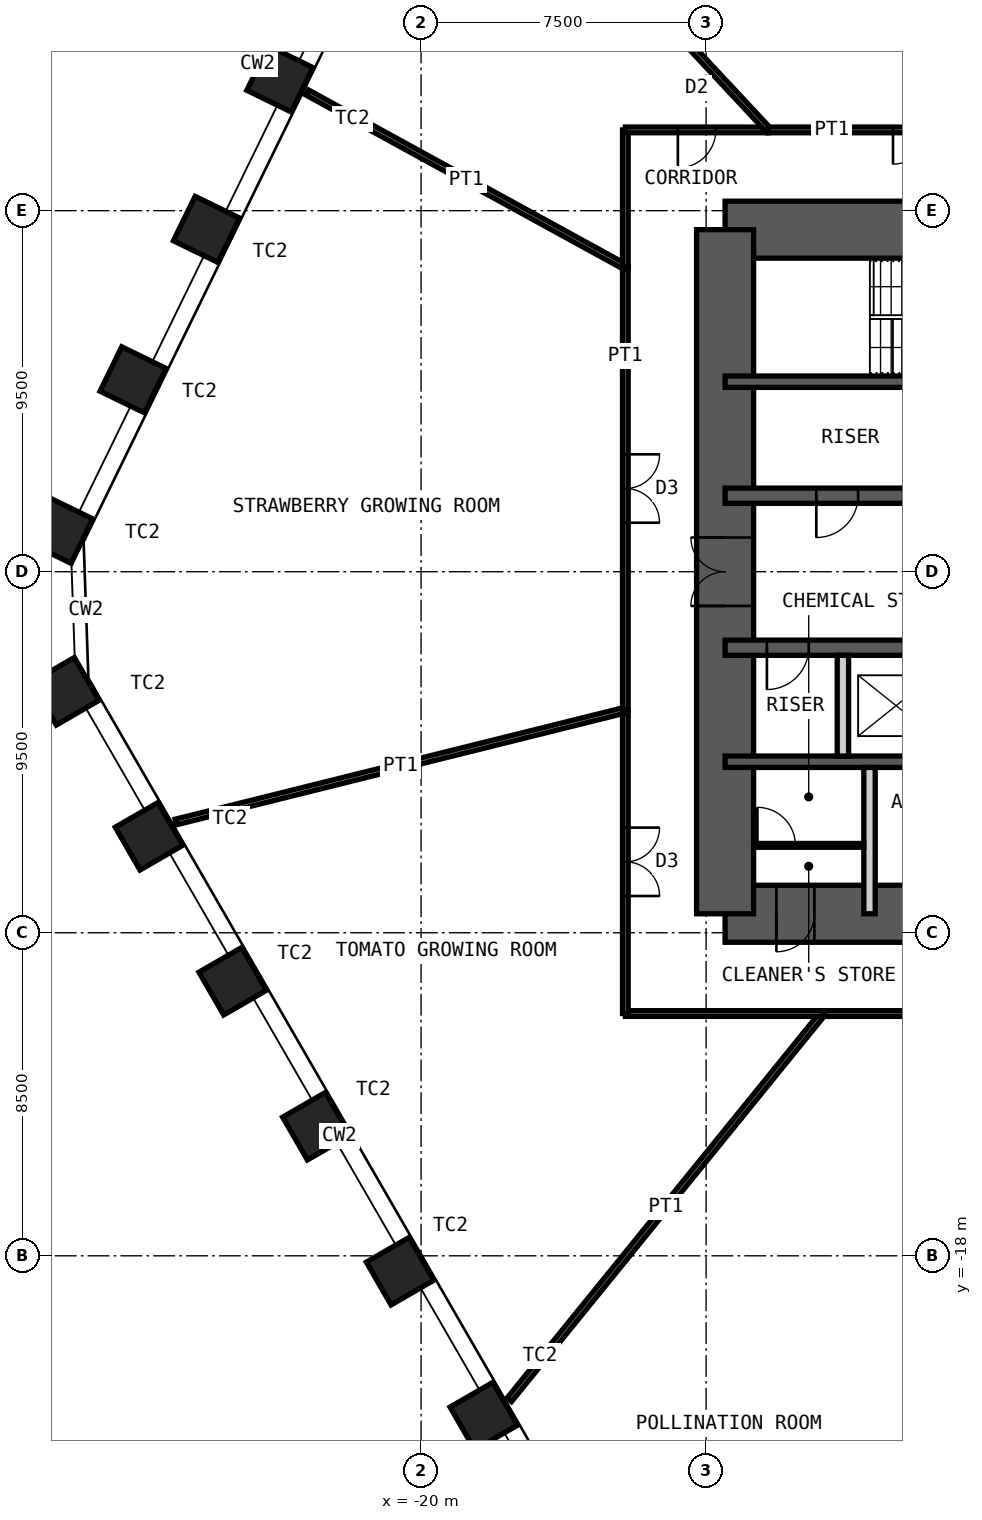
"""IFC4 building model, lengths in metres.
Left out: names, types, materials, properties, quantities, classifications, styles, units other than length and angle.
Written with IfcOpenShell. Run it as: python <this file> out.ifc"""

import sys

from ifc_helpers import new_model, si_unit, direction, frame, frame_2d, origin, origin_2d, place, context, subcontext, project, spatial, rectangle, hollow_rectangle, extrude, element, fill, save


model = new_model("IFC4")
c1 = context("Model", 3, precision=1e-05, world=origin(), true_north=direction((0.0, 1.0)))
c2 = subcontext(c1, "Body", "Model", "MODEL_VIEW")
j1 = project(units=[si_unit("LENGTHUNIT", "METRE"), si_unit("PLANEANGLEUNIT", "RADIAN")], contexts=[c1])
p1 = place(None, origin())
s1 = spatial("IfcSite", under=j1, at=p1, CompositionType="ELEMENT")
p2 = place(p1, origin())
s2 = spatial("IfcBuilding", under=s1, at=p2, CompositionType="ELEMENT")
p3 = place(p2, frame((0.0, 0.0, 77.0)))
s3 = spatial("IfcBuildingStorey", under=s2, at=p3, CompositionType="ELEMENT", Elevation=77.0)
for number, where, z_axis, x_axis in (
    (1, (-18.349, -22.218, 0.0), (0.0, 0.0, 1.0), (0.5, -0.866, 0.0)),
    (2, (-20.552, -18.404, 0.0), (0.0, 0.0, 1.0), (0.5, -0.866, 0.0)),
    (3, (-22.754, -14.589, 0.0), (0.0, 0.0, 1.0), (0.5, -0.866, 0.0)),
    (4, (-24.956, -10.775, 0.0), (0.0, 0.0, 1.0), (0.5, -0.866, 0.0)),
    (5, (-27.158, -6.96, 0.0), (0.0, 0.0, 1.0), (0.5, -0.866, 0.0)),
    (6, (-29.361, -3.146, 0.0), (0.0, 0.0, 1.0), (0.5, -0.866, 0.0)),
    (7, (-29.509, 1.09, 0.0), (0.0, 0.0, 1.0), (-0.438, -0.899, 0.0)),
    (8, (-27.578, 5.049, 0.0), (0.0, 0.0, 1.0), (-0.438, -0.899, 0.0)),
    (9, (-25.647, 9.008, 0.0), (0.0, 0.0, 1.0), (-0.438, -0.899, 0.0)),
    (10, (-23.716, 12.966, 0.0), (0.0, 0.0, 1.0), (-0.438, -0.899, 0.0)),
):
    element("IfcColumn", number, at=place(p3, frame(where, z_axis=z_axis, x_axis=x_axis)), inside=s3, PredefinedType="COLUMN", context=c2, shape_type="SweptSolid", body=[
        extrude(hollow_rectangle(XDim=1.3, YDim=1.3, WallThickness=0.1, at=origin_2d()), origin(), (0.0, 0.0, 1.0), 5.0),
    ])
p4 = place(p3, frame((-12.0, 9.0, 0.0), z_axis=(0.0, 0.0, 1.0), x_axis=(1.0, 0.0, 0.0)))
e11 = element("IfcWall", 11, at=p4, inside=s3, PredefinedType="SHEAR", context=c2, shape_type="SweptSolid", body=[
    extrude(rectangle(XDim=24.0, YDim=1.5, at=frame_2d((12.0, 0.0))), origin(), (0.0, 0.0, 1.0), 5.0),
])
p5 = place(p4, frame((10.4, 0.0, 0.0)))
e12 = element("IfcOpeningElement", 12, at=p5, cuts=e11, PredefinedType="OPENING", context=c2, shape_type="SweptSolid", body=[
    extrude(rectangle(XDim=1.0, YDim=2.1, at=frame_2d((0.5, 1.05))), frame((0.0, 0.76, 0.0), z_axis=(0.0, -1.0, 0.0), x_axis=(1.0, 0.0, 0.0)), (0.0, 0.0, 1.0), 1.52),
])
p6 = place(p4, frame((17.6, 0.0, 0.0)))
e13 = element("IfcOpeningElement", 13, at=p6, cuts=e11, PredefinedType="OPENING", context=c2, shape_type="SweptSolid", body=[
    extrude(rectangle(XDim=0.9, YDim=2.1, at=frame_2d((0.45, 1.05))), frame((0.0, 0.76, 0.0), z_axis=(0.0, -1.0, 0.0), x_axis=(1.0, 0.0, 0.0)), (0.0, 0.0, 1.0), 1.52),
])
p7 = place(p4, frame((21.9, 0.0, 0.0)))
e14 = element("IfcOpeningElement", 14, at=p7, cuts=e11, PredefinedType="OPENING", context=c2, shape_type="SweptSolid", body=[
    extrude(rectangle(XDim=0.9, YDim=2.1, at=frame_2d((0.45, 1.05))), frame((0.0, 0.76, 0.0), z_axis=(0.0, -1.0, 0.0), x_axis=(1.0, 0.0, 0.0)), (0.0, 0.0, 1.0), 1.52),
])
p8 = place(p3, frame((-12.0, -9.0, 0.0), z_axis=(0.0, 0.0, 1.0), x_axis=(1.0, 0.0, 0.0)))
e15 = element("IfcWall", 15, at=p8, inside=s3, PredefinedType="SHEAR", context=c2, shape_type="SweptSolid", body=[
    extrude(rectangle(XDim=24.0, YDim=1.5, at=frame_2d((12.0, 0.0))), origin(), (0.0, 0.0, 1.0), 5.0),
])
p9 = place(p8, frame((1.35, 0.0, 0.0)))
e16 = element("IfcOpeningElement", 16, at=p9, cuts=e15, PredefinedType="OPENING", context=c2, shape_type="SweptSolid", body=[
    extrude(rectangle(XDim=1.0, YDim=2.1, at=frame_2d((0.5, 1.05))), frame((0.0, 0.76, 0.0), z_axis=(0.0, -1.0, 0.0), x_axis=(1.0, 0.0, 0.0)), (0.0, 0.0, 1.0), 1.52),
])
p10 = place(p8, frame((5.325, 0.0, 0.0)))
e17 = element("IfcOpeningElement", 17, at=p10, cuts=e15, PredefinedType="OPENING", context=c2, shape_type="SweptSolid", body=[
    extrude(rectangle(XDim=1.15, YDim=2.1, at=frame_2d((0.575, 1.05))), frame((0.0, 0.76, 0.0), z_axis=(0.0, -1.0, 0.0), x_axis=(1.0, 0.0, 0.0)), (0.0, 0.0, 1.0), 1.52),
])
p11 = place(p8, frame((12.6, 0.0, 0.0)))
e18 = element("IfcOpeningElement", 18, at=p11, cuts=e15, PredefinedType="OPENING", context=c2, shape_type="SweptSolid", body=[
    extrude(rectangle(XDim=1.0, YDim=2.1, at=frame_2d((0.5, 1.05))), frame((0.0, 0.76, 0.0), z_axis=(0.0, -1.0, 0.0), x_axis=(1.0, 0.0, 0.0)), (0.0, 0.0, 1.0), 1.52),
])
p12 = place(p3, frame((-12.0, -9.0, 0.0), z_axis=(0.0, 0.0, 1.0), x_axis=(0.0, 1.0, 0.0)))
e19 = element("IfcWall", 19, at=p12, inside=s3, PredefinedType="SHEAR", context=c2, shape_type="SweptSolid", body=[
    extrude(rectangle(XDim=18.0, YDim=1.5, at=frame_2d((9.0, 0.0))), origin(), (0.0, 0.0, 1.0), 5.0),
])
p13 = place(p12, frame((8.1, 0.0, 0.0)))
e20 = element("IfcOpeningElement", 20, at=p13, cuts=e19, PredefinedType="OPENING", context=c2, shape_type="SweptSolid", body=[
    extrude(rectangle(XDim=1.8, YDim=2.1, at=frame_2d((0.9, 1.05))), frame((0.0, 0.76, 0.0), z_axis=(0.0, -1.0, 0.0), x_axis=(1.0, 0.0, 0.0)), (0.0, 0.0, 1.0), 1.52),
])
p14 = place(p3, frame((-12.0, 5.0, 0.0), z_axis=(0.0, 0.0, 1.0), x_axis=(1.0, 0.0, 0.0)))
e21 = element("IfcWall", 21, at=p14, inside=s3, PredefinedType="SHEAR", context=c2, shape_type="SweptSolid", body=[
    extrude(rectangle(XDim=24.0, YDim=0.3, at=frame_2d((12.0, 0.0))), origin(), (0.0, 0.0, 1.0), 5.0),
])
p15 = place(p3, frame((-12.0, 2.0, 0.0), z_axis=(0.0, 0.0, 1.0), x_axis=(1.0, 0.0, 0.0)))
e22 = element("IfcWall", 22, at=p15, inside=s3, PredefinedType="SHEAR", context=c2, shape_type="SweptSolid", body=[
    extrude(rectangle(XDim=24.0, YDim=0.4, at=frame_2d((12.0, 0.0))), origin(), (0.0, 0.0, 1.0), 5.0),
])
p16 = place(p15, frame((2.4, 0.0, 0.0)))
e23 = element("IfcOpeningElement", 23, at=p16, cuts=e22, PredefinedType="OPENING", context=c2, shape_type="SweptSolid", body=[
    extrude(rectangle(XDim=1.1, YDim=2.1, at=frame_2d((0.55, 1.05))), frame((0.0, 0.21, 0.0), z_axis=(0.0, -1.0, 0.0), x_axis=(1.0, 0.0, 0.0)), (0.0, 0.0, 1.0), 0.42),
])
p17 = place(p15, frame((22.0, 0.0, 0.0)))
e24 = element("IfcOpeningElement", 24, at=p17, cuts=e22, PredefinedType="OPENING", context=c2, shape_type="SweptSolid", body=[
    extrude(rectangle(XDim=1.1, YDim=2.1, at=frame_2d((0.55, 1.05))), frame((0.0, 0.21, 0.0), z_axis=(0.0, -1.0, 0.0), x_axis=(1.0, 0.0, 0.0)), (0.0, 0.0, 1.0), 0.42),
])
p18 = place(p15, frame((10.15, 0.0, 0.0)))
e25 = element("IfcOpeningElement", 25, at=p18, cuts=e22, PredefinedType="OPENING", context=c2, shape_type="SweptSolid", body=[
    extrude(rectangle(XDim=1.0, YDim=2.1, at=frame_2d((0.5, 1.05))), frame((0.0, 0.21, 0.0), z_axis=(0.0, -1.0, 0.0), x_axis=(1.0, 0.0, 0.0)), (0.0, 0.0, 1.0), 0.42),
])
p19 = place(p15, frame((6.7, 0.0, 0.0)))
e26 = element("IfcOpeningElement", 26, at=p19, cuts=e22, PredefinedType="OPENING", context=c2, shape_type="SweptSolid", body=[
    extrude(rectangle(XDim=1.4, YDim=2.4, at=frame_2d((0.7, 1.2))), frame((0.0, 0.21, 0.0), z_axis=(0.0, -1.0, 0.0), x_axis=(1.0, 0.0, 0.0)), (0.0, 0.0, 1.0), 0.42),
])
p20 = place(p15, frame((13.35, 0.0, 0.0)))
e27 = element("IfcOpeningElement", 27, at=p20, cuts=e22, PredefinedType="OPENING", context=c2, shape_type="SweptSolid", body=[
    extrude(rectangle(XDim=1.1, YDim=2.4, at=frame_2d((0.55, 1.2))), frame((0.0, 0.21, 0.0), z_axis=(0.0, -1.0, 0.0), x_axis=(1.0, 0.0, 0.0)), (0.0, 0.0, 1.0), 0.42),
])
p21 = place(p15, frame((16.15, 0.0, 0.0)))
e28 = element("IfcOpeningElement", 28, at=p21, cuts=e22, PredefinedType="OPENING", context=c2, shape_type="SweptSolid", body=[
    extrude(rectangle(XDim=1.1, YDim=2.4, at=frame_2d((0.55, 1.2))), frame((0.0, 0.21, 0.0), z_axis=(0.0, -1.0, 0.0), x_axis=(1.0, 0.0, 0.0)), (0.0, 0.0, 1.0), 0.42),
])
p22 = place(p15, frame((18.95, 0.0, 0.0)))
e29 = element("IfcOpeningElement", 29, at=p22, cuts=e22, PredefinedType="OPENING", context=c2, shape_type="SweptSolid", body=[
    extrude(rectangle(XDim=1.1, YDim=2.4, at=frame_2d((0.55, 1.2))), frame((0.0, 0.21, 0.0), z_axis=(0.0, -1.0, 0.0), x_axis=(1.0, 0.0, 0.0)), (0.0, 0.0, 1.0), 0.42),
])
p23 = place(p3, frame((-12.0, -2.0, 0.0), z_axis=(0.0, 0.0, 1.0), x_axis=(1.0, 0.0, 0.0)))
e30 = element("IfcWall", 30, at=p23, inside=s3, PredefinedType="SHEAR", context=c2, shape_type="SweptSolid", body=[
    extrude(rectangle(XDim=24.0, YDim=0.4, at=frame_2d((12.0, 0.0))), origin(), (0.0, 0.0, 1.0), 5.0),
])
p24 = place(p23, frame((1.1, 0.0, 0.0)))
e31 = element("IfcOpeningElement", 31, at=p24, cuts=e30, PredefinedType="OPENING", context=c2, shape_type="SweptSolid", body=[
    extrude(rectangle(XDim=1.1, YDim=2.1, at=frame_2d((0.55, 1.05))), frame((0.0, 0.21, 0.0), z_axis=(0.0, -1.0, 0.0), x_axis=(1.0, 0.0, 0.0)), (0.0, 0.0, 1.0), 0.42),
])
p25 = place(p23, frame((13.55, 0.0, 0.0)))
e32 = element("IfcOpeningElement", 32, at=p25, cuts=e30, PredefinedType="OPENING", context=c2, shape_type="SweptSolid", body=[
    extrude(rectangle(XDim=1.1, YDim=2.1, at=frame_2d((0.55, 1.05))), frame((0.0, 0.21, 0.0), z_axis=(0.0, -1.0, 0.0), x_axis=(1.0, 0.0, 0.0)), (0.0, 0.0, 1.0), 0.42),
])
p26 = place(p23, frame((20.7, 0.0, 0.0)))
e33 = element("IfcOpeningElement", 33, at=p26, cuts=e30, PredefinedType="OPENING", context=c2, shape_type="SweptSolid", body=[
    extrude(rectangle(XDim=1.1, YDim=2.1, at=frame_2d((0.55, 1.05))), frame((0.0, 0.21, 0.0), z_axis=(0.0, -1.0, 0.0), x_axis=(1.0, 0.0, 0.0)), (0.0, 0.0, 1.0), 0.42),
])
p27 = place(p3, frame((-12.0, -5.0, 0.0), z_axis=(0.0, 0.0, 1.0), x_axis=(1.0, 0.0, 0.0)))
e34 = element("IfcWall", 34, at=p27, inside=s3, PredefinedType="SHEAR", context=c2, shape_type="SweptSolid", body=[
    extrude(rectangle(XDim=24.0, YDim=0.3, at=frame_2d((12.0, 0.0))), origin(), (0.0, 0.0, 1.0), 5.0),
])
p28 = place(p3, frame((-8.9, -4.85, 0.0), z_axis=(0.0, 0.0, 1.0), x_axis=(0.0, 1.0, 0.0)))
e35 = element("IfcWall", 35, at=p28, inside=s3, PredefinedType="PARTITIONING", context=c2, shape_type="SweptSolid", body=[
    extrude(rectangle(XDim=2.65, YDim=0.3, at=frame_2d((1.325, 0.0))), origin(), (0.0, 0.0, 1.0), 4.78),
])
p29 = place(p3, frame((-8.2, -9.0, 0.0), z_axis=(0.0, 0.0, 1.0), x_axis=(0.0, 1.0, 0.0)))
e36 = element("IfcWall", 36, at=p29, inside=s3, PredefinedType="PARTITIONING", context=c2, shape_type="SweptSolid", body=[
    extrude(rectangle(XDim=3.85, YDim=0.3, at=frame_2d((1.925, 0.0))), origin(), (0.0, 0.0, 1.0), 4.78),
])
p30 = place(p3, frame((-11.25, -7.2, 0.0), z_axis=(0.0, 0.0, 1.0), x_axis=(1.0, 0.0, 0.0)))
e37 = element("IfcWall", 37, at=p30, inside=s3, PredefinedType="PARTITIONING", context=c2, shape_type="SweptSolid", body=[
    extrude(rectangle(XDim=2.9, YDim=0.1, at=frame_2d((1.45, 0.0))), origin(), (0.0, 0.0, 1.0), 4.78),
])
p31 = place(p30, frame((0.1, 0.0, 0.0)))
e38 = element("IfcOpeningElement", 38, at=p31, cuts=e37, PredefinedType="OPENING", context=c2, shape_type="SweptSolid", body=[
    extrude(rectangle(XDim=1.0, YDim=2.4, at=frame_2d((0.5, 1.2))), frame((0.0, 0.06, 0.0), z_axis=(0.0, -1.0, 0.0), x_axis=(1.0, 0.0, 0.0)), (0.0, 0.0, 1.0), 0.12),
])
p32 = place(p3, frame((-8.179, -26.843, 0.0), z_axis=(0.0, 0.0, 1.0), x_axis=(0.291466333136, 0.956581087336, 0.0)))
e39 = element("IfcWall", 39, at=p32, inside=s3, PredefinedType="PARTITIONING", context=c2, shape_type="SweptSolid", body=[
    extrude(rectangle(XDim=15.908, YDim=0.15, at=frame_2d((7.954, 0.0))), origin(), (0.0, 0.0, 1.0), 3.7),
])
p33 = place(p3, frame((-3.542, -11.625, 0.0), z_axis=(0.0, 0.0, 1.0), x_axis=(-1.0, 0.0, 0.0)))
e40 = element("IfcWall", 40, at=p33, inside=s3, PredefinedType="PARTITIONING", context=c2, shape_type="SweptSolid", body=[
    extrude(rectangle(XDim=5.89, YDim=0.15, at=frame_2d((2.945, 0.0))), origin(), (0.0, 0.0, 1.0), 4.8),
])
p34 = place(p33, frame((2.445, 0.0, 0.0)))
e41 = element("IfcOpeningElement", 41, at=p34, cuts=e40, PredefinedType="OPENING", context=c2, shape_type="SweptSolid", body=[
    extrude(rectangle(XDim=1.0, YDim=2.4, at=frame_2d((0.5, 1.2))), frame((0.0, 0.085, 0.0), z_axis=(0.0, -1.0, 0.0), x_axis=(1.0, 0.0, 0.0)), (0.0, 0.0, 1.0), 0.17),
])
p35 = place(p3, frame((-17.68, -21.791, 0.0), z_axis=(0.0, 0.0, 1.0), x_axis=(0.630054650118, 0.776550795418, 0.0)))
e42 = element("IfcWall", 42, at=p35, inside=s3, PredefinedType="PARTITIONING", context=c2, shape_type="SweptSolid", body=[
    extrude(rectangle(XDim=13.091, YDim=0.15, at=frame_2d((6.545, 0.0))), origin(), (0.0, 0.0, 1.0), 3.7),
])
p36 = place(p3, frame((-9.432, -11.625, 0.0), z_axis=(0.0, 0.0, 1.0), x_axis=(-1.0, 0.0, 0.0)))
e43 = element("IfcWall", 43, at=p36, inside=s3, PredefinedType="PARTITIONING", context=c2, shape_type="SweptSolid", body=[
    extrude(rectangle(XDim=5.193, YDim=0.15, at=frame_2d((2.596, 0.0))), origin(), (0.0, 0.0, 1.0), 4.8),
])
p37 = place(p3, frame((-14.625, -11.625, 0.0), z_axis=(0.0, 0.0, 1.0), x_axis=(0.0, 1.0, 0.0)))
e44 = element("IfcWall", 44, at=p37, inside=s3, PredefinedType="PARTITIONING", context=c2, shape_type="SweptSolid", body=[
    extrude(rectangle(XDim=7.984, YDim=0.15, at=frame_2d((3.992, 0.0))), origin(), (0.0, 0.0, 1.0), 4.8),
])
p38 = place(p37, frame((3.092, 0.0, 0.0)))
e45 = element("IfcOpeningElement", 45, at=p38, cuts=e44, PredefinedType="OPENING", context=c2, shape_type="SweptSolid", body=[
    extrude(rectangle(XDim=1.8, YDim=2.4, at=frame_2d((0.9, 1.2))), frame((0.0, 0.085, 0.0), z_axis=(0.0, -1.0, 0.0), x_axis=(1.0, 0.0, 0.0)), (0.0, 0.0, 1.0), 0.17),
])
p39 = place(p3, frame((-26.455, -6.586, 0.0), z_axis=(0.0, 0.0, 1.0), x_axis=(0.970383505188, 0.241569561118, 0.0)))
e46 = element("IfcWall", 46, at=p39, inside=s3, PredefinedType="PARTITIONING", context=c2, shape_type="SweptSolid", body=[
    extrude(rectangle(XDim=12.191, YDim=0.15, at=frame_2d((6.096, 0.0))), origin(), (0.0, 0.0, 1.0), 3.7),
])
p40 = place(p3, frame((-14.625, -3.641, 0.0), z_axis=(0.0, 0.0, 1.0), x_axis=(0.0, 1.0, 0.0)))
e47 = element("IfcWall", 47, at=p40, inside=s3, PredefinedType="PARTITIONING", context=c2, shape_type="SweptSolid", body=[
    extrude(rectangle(XDim=11.66, YDim=0.15, at=frame_2d((5.83, 0.0))), origin(), (0.0, 0.0, 1.0), 4.8),
])
p41 = place(p40, frame((4.93, 0.0, 0.0)))
e48 = element("IfcOpeningElement", 48, at=p41, cuts=e47, PredefinedType="OPENING", context=c2, shape_type="SweptSolid", body=[
    extrude(rectangle(XDim=1.8, YDim=2.4, at=frame_2d((0.9, 1.2))), frame((0.0, 0.085, 0.0), z_axis=(0.0, -1.0, 0.0), x_axis=(1.0, 0.0, 0.0)), (0.0, 0.0, 1.0), 0.17),
])
p42 = place(p3, frame((-22.999, 12.612, 0.0), z_axis=(0.0, 0.0, 1.0), x_axis=(0.876825619135, -0.480808520752, 0.0)))
e49 = element("IfcWall", 49, at=p42, inside=s3, PredefinedType="PARTITIONING", context=c2, shape_type="SweptSolid", body=[
    extrude(rectangle(XDim=9.551, YDim=0.15, at=frame_2d((4.775, 0.0))), origin(), (0.0, 0.0, 1.0), 3.7),
])
p43 = place(p3, frame((-14.625, 8.02, 0.0), z_axis=(0.0, 0.0, 1.0), x_axis=(0.0, 1.0, 0.0)))
e50 = element("IfcWall", 50, at=p43, inside=s3, PredefinedType="PARTITIONING", context=c2, shape_type="SweptSolid", body=[
    extrude(rectangle(XDim=3.605, YDim=0.15, at=frame_2d((1.803, 0.0))), origin(), (0.0, 0.0, 1.0), 4.8),
])
p44 = place(p3, frame((-14.625, 11.625, 0.0), z_axis=(0.0, 0.0, 1.0), x_axis=(1.0, 0.0, 0.0)))
e51 = element("IfcWall", 51, at=p44, inside=s3, PredefinedType="PARTITIONING", context=c2, shape_type="SweptSolid", body=[
    extrude(rectangle(XDim=3.764, YDim=0.15, at=frame_2d((1.882, 0.0))), origin(), (0.0, 0.0, 1.0), 4.8),
])
p45 = place(p44, frame((1.382, 0.0, 0.0)))
e52 = element("IfcOpeningElement", 52, at=p45, cuts=e51, PredefinedType="OPENING", context=c2, shape_type="SweptSolid", body=[
    extrude(rectangle(XDim=1.0, YDim=2.4, at=frame_2d((0.5, 1.2))), frame((0.0, 0.085, 0.0), z_axis=(0.0, -1.0, 0.0), x_axis=(1.0, 0.0, 0.0)), (0.0, 0.0, 1.0), 0.17),
])
p46 = place(p3, frame((-19.157, 20.504, 0.0), z_axis=(0.0, 0.0, 1.0), x_axis=(0.682689688298, -0.73070841619, 0.0)))
e53 = element("IfcWall", 53, at=p46, inside=s3, PredefinedType="PARTITIONING", context=c2, shape_type="SweptSolid", body=[
    extrude(rectangle(XDim=12.151, YDim=0.15, at=frame_2d((6.076, 0.0))), origin(), (0.0, 0.0, 1.0), 3.7),
])
p47 = place(p3, frame((-10.861, 11.625, 0.0), z_axis=(0.0, 0.0, 1.0), x_axis=(1.0, 0.0, 0.0)))
e54 = element("IfcWall", 54, at=p47, inside=s3, PredefinedType="PARTITIONING", context=c2, shape_type="SweptSolid", body=[
    extrude(rectangle(XDim=8.359, YDim=0.15, at=frame_2d((4.179, 0.0))), origin(), (0.0, 0.0, 1.0), 4.8),
])
p48 = place(p47, frame((3.279, 0.0, 0.0)))
e55 = element("IfcOpeningElement", 55, at=p48, cuts=e54, PredefinedType="OPENING", context=c2, shape_type="SweptSolid", body=[
    extrude(rectangle(XDim=1.8, YDim=2.4, at=frame_2d((0.9, 1.2))), frame((0.0, 0.085, 0.0), z_axis=(0.0, -1.0, 0.0), x_axis=(1.0, 0.0, 0.0)), (0.0, 0.0, 1.0), 0.17),
])
p49 = place(p9, origin())
e56 = element("IfcDoor", 56, at=p49, inside=s3, OperationType="SINGLE_SWING_LEFT", PredefinedType="DOOR", context=c2, shape_type="SweptSolid", body=[
    extrude(rectangle(XDim=1.0, YDim=2.1, at=frame_2d((0.5, 1.05))), frame((0.0, 0.025, 0.0), z_axis=(0.0, -1.0, 0.0), x_axis=(1.0, 0.0, 0.0)), (0.0, 0.0, 1.0), 0.05),
])
fill(e16, e56)
p50 = place(p16, origin())
e57 = element("IfcDoor", 57, at=p50, inside=s3, OperationType="SINGLE_SWING_LEFT", PredefinedType="DOOR", context=c2, shape_type="SweptSolid", body=[
    extrude(rectangle(XDim=1.1, YDim=2.1, at=frame_2d((0.55, 1.05))), frame((0.0, 0.025, 0.0), z_axis=(0.0, -1.0, 0.0), x_axis=(1.0, 0.0, 0.0)), (0.0, 0.0, 1.0), 0.05),
])
fill(e23, e57)
p51 = place(p24, origin())
e58 = element("IfcDoor", 58, at=p51, inside=s3, OperationType="SINGLE_SWING_LEFT", PredefinedType="DOOR", context=c2, shape_type="SweptSolid", body=[
    extrude(rectangle(XDim=1.1, YDim=2.1, at=frame_2d((0.55, 1.05))), frame((0.0, 0.025, 0.0), z_axis=(0.0, -1.0, 0.0), x_axis=(1.0, 0.0, 0.0)), (0.0, 0.0, 1.0), 0.05),
])
fill(e31, e58)
p52 = place(p13, origin())
e59 = element("IfcDoor", 59, at=p52, inside=s3, OperationType="DOUBLE_DOOR_DOUBLE_SWING", PredefinedType="DOOR", context=c2, shape_type="SweptSolid", body=[
    extrude(rectangle(XDim=1.8, YDim=2.1, at=frame_2d((0.9, 1.05))), frame((0.0, 0.025, 0.0), z_axis=(0.0, -1.0, 0.0), x_axis=(1.0, 0.0, 0.0)), (0.0, 0.0, 1.0), 0.05),
])
fill(e20, e59)
p53 = place(p31, origin())
e60 = element("IfcDoor", 60, at=p53, inside=s3, OperationType="SINGLE_SWING_RIGHT", PredefinedType="DOOR", context=c2, shape_type="SweptSolid", body=[
    extrude(rectangle(XDim=1.0, YDim=2.4, at=frame_2d((0.5, 1.2))), frame((0.0, 0.025, 0.0), z_axis=(0.0, -1.0, 0.0), x_axis=(1.0, 0.0, 0.0)), (0.0, 0.0, 1.0), 0.05),
])
fill(e38, e60)
p54 = place(p38, origin())
e61 = element("IfcDoor", 61, at=p54, inside=s3, OperationType="DOUBLE_DOOR_DOUBLE_SWING", PredefinedType="DOOR", context=c2, shape_type="SweptSolid", body=[
    extrude(rectangle(XDim=1.8, YDim=2.4, at=frame_2d((0.9, 1.2))), frame((0.0, 0.025, 0.0), z_axis=(0.0, -1.0, 0.0), x_axis=(1.0, 0.0, 0.0)), (0.0, 0.0, 1.0), 0.05),
])
fill(e45, e61)
p55 = place(p41, origin())
e62 = element("IfcDoor", 62, at=p55, inside=s3, OperationType="DOUBLE_DOOR_DOUBLE_SWING", PredefinedType="DOOR", context=c2, shape_type="SweptSolid", body=[
    extrude(rectangle(XDim=1.8, YDim=2.4, at=frame_2d((0.9, 1.2))), frame((0.0, 0.025, 0.0), z_axis=(0.0, -1.0, 0.0), x_axis=(1.0, 0.0, 0.0)), (0.0, 0.0, 1.0), 0.05),
])
fill(e48, e62)
p56 = place(p45, origin())
e63 = element("IfcDoor", 63, at=p56, inside=s3, OperationType="SINGLE_SWING_LEFT", PredefinedType="DOOR", context=c2, shape_type="SweptSolid", body=[
    extrude(rectangle(XDim=1.0, YDim=2.4, at=frame_2d((0.5, 1.2))), frame((0.0, 0.025, 0.0), z_axis=(0.0, -1.0, 0.0), x_axis=(1.0, 0.0, 0.0)), (0.0, 0.0, 1.0), 0.05),
])
fill(e52, e63)
p57 = place(p48, origin())
e64 = element("IfcDoor", 64, at=p57, inside=s3, OperationType="DOUBLE_DOOR_DOUBLE_SWING", PredefinedType="DOOR", context=c2, shape_type="SweptSolid", body=[
    extrude(rectangle(XDim=1.8, YDim=2.4, at=frame_2d((0.9, 1.2))), frame((0.0, 0.025, 0.0), z_axis=(0.0, -1.0, 0.0), x_axis=(1.0, 0.0, 0.0)), (0.0, 0.0, 1.0), 0.05),
])
fill(e55, e64)
save(model, sys.argv[1])
